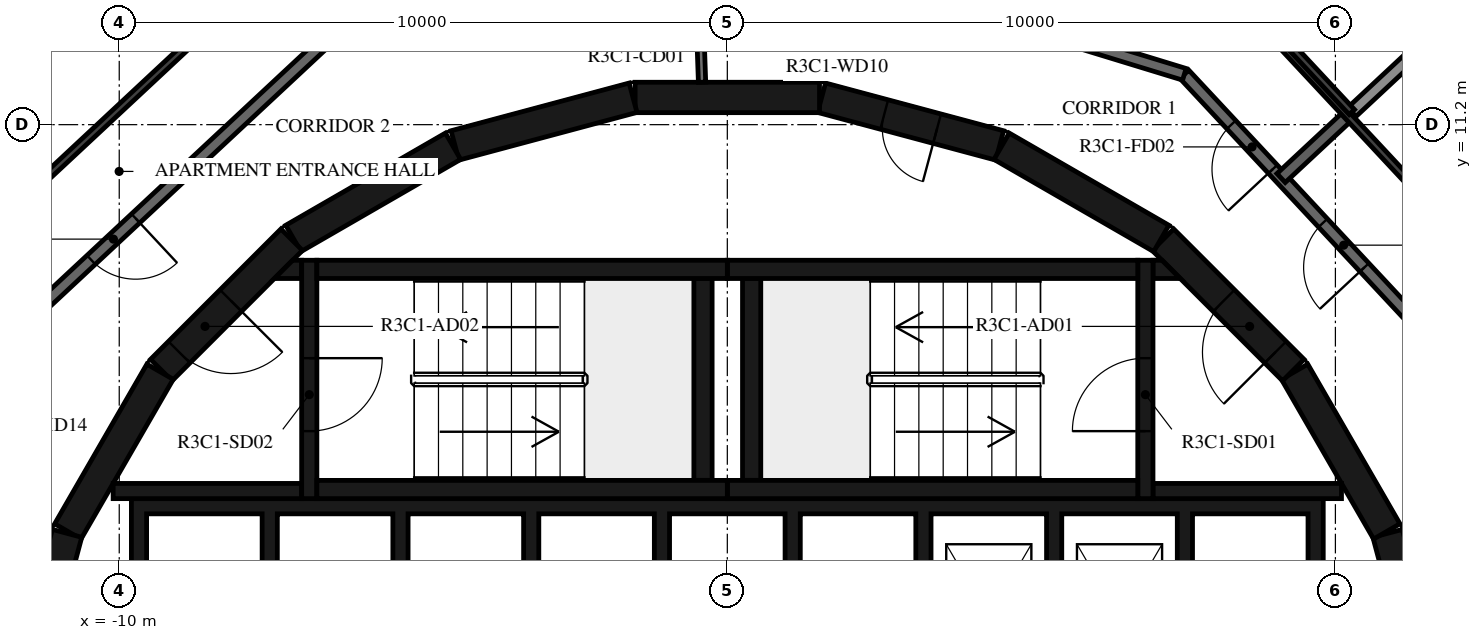
"""IFC4 building model, lengths in metres.
Left out: names, types, materials, properties, quantities, classifications, styles, units other than length and angle.
Written with IfcOpenShell. Run it as: python <this file> out.ifc"""

import sys

from ifc_helpers import new_model, si_unit, direction, frame, frame_2d, origin, place, context, subcontext, project, spatial, polyline, rectangle, outline, extrude, element, fill, save


model = new_model("IFC4")
c1 = context("Model", 3, precision=1e-05, world=origin(), true_north=direction((0.0, 1.0)))
c2 = subcontext(c1, "Body", "Model", "MODEL_VIEW")
j1 = project(units=[si_unit("LENGTHUNIT", "METRE"), si_unit("PLANEANGLEUNIT", "RADIAN")], contexts=[c1])
p1 = place(None, origin())
s1 = spatial("IfcSite", under=j1, at=p1, CompositionType="ELEMENT")
p2 = place(p1, origin())
s2 = spatial("IfcBuilding", under=s1, at=p2, CompositionType="ELEMENT")
p3 = place(p2, frame((0.0, 0.0, 137.9)))
s3 = spatial("IfcBuildingStorey", under=s2, at=p3, CompositionType="ELEMENT", Elevation=137.9)
for number, where, z_axis, x_axis in (
    (1, (11.643, 1.55, 0.0), (0.0, 0.0, 1.0), (-0.259, 0.966, 0.0)),
    (2, (10.845, 4.51, 0.0), (0.0, 0.0, 1.0), (-0.5, 0.866, 0.0)),
):
    element("IfcWall", number, at=place(p3, frame(where, z_axis=z_axis, x_axis=x_axis)), inside=s3, PredefinedType="SHEAR", context=c2, shape_type="SweptSolid", body=[
        extrude(rectangle(XDim=3.033, YDim=0.5, at=frame_2d((1.516, 0.0))), origin(), (0.0, 0.0, 1.0), 3.12),
    ])
p4 = place(p3, frame((9.308, 7.164, 0.0), z_axis=(0.0, 0.0, 1.0), x_axis=(-0.707106781187, 0.707106781187, 0.0)))
e3 = element("IfcWall", 3, at=p4, inside=s3, PredefinedType="SHEAR", context=c2, shape_type="SweptSolid", body=[
    extrude(rectangle(XDim=3.032, YDim=0.5, at=frame_2d((1.516, 0.0))), origin(), (0.0, 0.0, 1.0), 3.12),
])
p5 = place(p4, frame((0.416, 0.0, 0.0)))
e4 = element("IfcOpeningElement", 4, at=p5, cuts=e3, PredefinedType="OPENING", context=c2, shape_type="SweptSolid", body=[
    extrude(rectangle(XDim=1.2, YDim=2.1, at=frame_2d((0.6, 1.05))), frame((0.0, 0.26, 0.0), z_axis=(0.0, -1.0, 0.0), x_axis=(1.0, 0.0, 0.0)), (0.0, 0.0, 1.0), 0.52),
])
p6 = place(p3, frame((7.137, 9.329, 0.0), z_axis=(0.0, 0.0, 1.0), x_axis=(-0.865975092491, 0.500087131594, 0.0)))
e5 = element("IfcWall", 5, at=p6, inside=s3, PredefinedType="SHEAR", context=c2, shape_type="SweptSolid", body=[
    extrude(rectangle(XDim=3.033, YDim=0.5, at=frame_2d((1.516, 0.0))), origin(), (0.0, 0.0, 1.0), 3.12),
])
p7 = place(p3, frame((4.479, 10.858, 0.0), z_axis=(0.0, 0.0, 1.0), x_axis=(-0.965948410781, 0.258734743916, 0.0)))
e6 = element("IfcWall", 6, at=p7, inside=s3, PredefinedType="SHEAR", context=c2, shape_type="SweptSolid", body=[
    extrude(rectangle(XDim=3.033, YDim=0.5, at=frame_2d((1.516, 0.0))), origin(), (0.0, 0.0, 1.0), 3.12),
])
p8 = place(p7, frame((1.066, 0.0, 0.0)))
e7 = element("IfcOpeningElement", 7, at=p8, cuts=e6, PredefinedType="OPENING", context=c2, shape_type="SweptSolid", body=[
    extrude(rectangle(XDim=0.9, YDim=2.1, at=frame_2d((0.45, 1.05))), frame((0.0, 0.26, 0.0), z_axis=(0.0, -1.0, 0.0), x_axis=(1.0, 0.0, 0.0)), (0.0, 0.0, 1.0), 0.52),
])
for number, where, z_axis, x_axis in (
    (8, (1.516, 11.647, 0.0), (0.0, 0.0, 1.0), (-1.0, 0.0, 0.0)),
    (9, (-1.55, 11.643, 0.0), (0.0, 0.0, 1.0), (-0.966, -0.259, 0.0)),
    (10, (-4.51, 10.845, 0.0), (0.0, 0.0, 1.0), (-0.866, -0.5, 0.0)),
):
    element("IfcWall", number, at=place(p3, frame(where, z_axis=z_axis, x_axis=x_axis)), inside=s3, PredefinedType="SHEAR", context=c2, shape_type="SweptSolid", body=[
        extrude(rectangle(XDim=3.033, YDim=0.5, at=frame_2d((1.516, 0.0))), origin(), (0.0, 0.0, 1.0), 3.12),
    ])
p9 = place(p3, frame((-7.164, 9.308, 0.0), z_axis=(0.0, 0.0, 1.0), x_axis=(-0.707106781187, -0.707106781187, 0.0)))
e11 = element("IfcWall", 11, at=p9, inside=s3, PredefinedType="SHEAR", context=c2, shape_type="SweptSolid", body=[
    extrude(rectangle(XDim=3.032, YDim=0.5, at=frame_2d((1.516, 0.0))), origin(), (0.0, 0.0, 1.0), 3.12),
])
p10 = place(p9, frame((1.416, 0.0, 0.0)))
e12 = element("IfcOpeningElement", 12, at=p10, cuts=e11, PredefinedType="OPENING", context=c2, shape_type="SweptSolid", body=[
    extrude(rectangle(XDim=1.2, YDim=2.1, at=frame_2d((0.6, 1.05))), frame((0.0, 0.26, 0.0), z_axis=(0.0, -1.0, 0.0), x_axis=(1.0, 0.0, 0.0)), (0.0, 0.0, 1.0), 0.52),
])
for number, where, z_axis, x_axis in (
    (13, (-9.329, 7.137, 0.0), (0.0, 0.0, 1.0), (-0.5, -0.866, 0.0)),
    (14, (-10.858, 4.479, 0.0), (0.0, 0.0, 1.0), (-0.259, -0.966, 0.0)),
):
    element("IfcWall", number, at=place(p3, frame(where, z_axis=z_axis, x_axis=x_axis)), inside=s3, PredefinedType="SHEAR", context=c2, shape_type="SweptSolid", body=[
        extrude(rectangle(XDim=3.033, YDim=0.5, at=frame_2d((1.516, 0.0))), origin(), (0.0, 0.0, 1.0), 3.12),
    ])
for number, where, z_axis, x_axis in (
    (15, (0.0, 5.2, 0.0), (0.0, 0.0, 1.0), (1.0, 0.0, 0.0)),
    (16, (0.0, 8.82, 0.0), (0.0, 0.0, 1.0), (1.0, 0.0, 0.0)),
):
    element("IfcWall", number, at=place(p3, frame(where, z_axis=z_axis, x_axis=x_axis)), inside=s3, PredefinedType="SHEAR", context=c2, shape_type="SweptSolid", body=[
        extrude(rectangle(XDim=6.75, YDim=0.3, at=frame_2d((3.375, 0.0))), origin(), (0.0, 0.0, 1.0), 3.12),
    ])
p11 = place(p3, frame((0.4, 5.35, 0.0), z_axis=(0.0, 0.0, 1.0), x_axis=(0.0, 1.0, 0.0)))
e17 = element("IfcWall", 17, at=p11, inside=s3, PredefinedType="SHEAR", context=c2, shape_type="SweptSolid", body=[
    extrude(rectangle(XDim=3.32, YDim=0.3, at=frame_2d((1.66, 0.0))), origin(), (0.0, 0.0, 1.0), 3.12),
])
p12 = place(p3, frame((6.875, 5.05, 0.0), z_axis=(0.0, 0.0, 1.0), x_axis=(0.0, 1.0, 0.0)))
e18 = element("IfcWall", 18, at=p12, inside=s3, PredefinedType="SHEAR", context=c2, shape_type="SweptSolid", body=[
    extrude(rectangle(XDim=3.92, YDim=0.25, at=frame_2d((1.96, 0.0))), origin(), (0.0, 0.0, 1.0), 3.12),
])
p13 = place(p12, frame((1.11, 0.0, 0.0)))
e19 = element("IfcOpeningElement", 19, at=p13, cuts=e18, PredefinedType="OPENING", context=c2, shape_type="SweptSolid", body=[
    extrude(rectangle(XDim=1.2, YDim=2.1, at=frame_2d((0.6, 1.05))), frame((0.0, 0.135, 0.0), z_axis=(0.0, -1.0, 0.0), x_axis=(1.0, 0.0, 0.0)), (0.0, 0.0, 1.0), 0.27),
])
p14 = place(p3, frame((7.0, 5.175, 0.0), z_axis=(0.0, 0.0, 1.0), x_axis=(1.0, 0.0, 0.0)))
e20 = element("IfcWall", 20, at=p14, inside=s3, PredefinedType="SHEAR", context=c2, shape_type="SweptSolid", body=[
    extrude(rectangle(XDim=3.1, YDim=0.25, at=frame_2d((1.55, 0.0))), origin(), (0.0, 0.0, 1.0), 3.12),
])
p15 = place(p3, origin())
e21 = element("IfcWall", 21, at=p15, inside=s3, PredefinedType="SHEAR", context=c2, shape_type="SweptSolid", body=[
    extrude(outline(polyline([(7.448, 8.67), (7.0, 8.67), (7.0, 8.97), (7.148, 8.97), (7.448, 8.67)])), origin(), (0.0, 0.0, 1.0), 3.12),
])
for number, where, z_axis, x_axis in (
    (22, (-6.75, 5.2, 0.0), (0.0, 0.0, 1.0), (1.0, 0.0, 0.0)),
    (23, (-6.75, 8.82, 0.0), (0.0, 0.0, 1.0), (1.0, 0.0, 0.0)),
):
    element("IfcWall", number, at=place(p3, frame(where, z_axis=z_axis, x_axis=x_axis)), inside=s3, PredefinedType="SHEAR", context=c2, shape_type="SweptSolid", body=[
        extrude(rectangle(XDim=6.75, YDim=0.3, at=frame_2d((3.375, 0.0))), origin(), (0.0, 0.0, 1.0), 3.12),
    ])
p16 = place(p3, frame((-0.4, 5.35, 0.0), z_axis=(0.0, 0.0, 1.0), x_axis=(0.0, 1.0, 0.0)))
e24 = element("IfcWall", 24, at=p16, inside=s3, PredefinedType="SHEAR", context=c2, shape_type="SweptSolid", body=[
    extrude(rectangle(XDim=3.32, YDim=0.3, at=frame_2d((1.66, 0.0))), origin(), (0.0, 0.0, 1.0), 3.12),
])
p17 = place(p3, frame((-6.875, 8.97, 0.0), z_axis=(0.0, 0.0, 1.0), x_axis=(0.0, -1.0, 0.0)))
e25 = element("IfcWall", 25, at=p17, inside=s3, PredefinedType="SHEAR", context=c2, shape_type="SweptSolid", body=[
    extrude(rectangle(XDim=3.92, YDim=0.25, at=frame_2d((1.96, 0.0))), origin(), (0.0, 0.0, 1.0), 3.12),
])
p18 = place(p17, frame((1.61, 0.0, 0.0)))
e26 = element("IfcOpeningElement", 26, at=p18, cuts=e25, PredefinedType="OPENING", context=c2, shape_type="SweptSolid", body=[
    extrude(rectangle(XDim=1.2, YDim=2.1, at=frame_2d((0.6, 1.05))), frame((0.0, 0.135, 0.0), z_axis=(0.0, -1.0, 0.0), x_axis=(1.0, 0.0, 0.0)), (0.0, 0.0, 1.0), 0.27),
])
p19 = place(p3, frame((-7.0, 5.175, 0.0), z_axis=(0.0, 0.0, 1.0), x_axis=(-1.0, 0.0, 0.0)))
e27 = element("IfcWall", 27, at=p19, inside=s3, PredefinedType="SHEAR", context=c2, shape_type="SweptSolid", body=[
    extrude(rectangle(XDim=3.1, YDim=0.25, at=frame_2d((1.55, 0.0))), origin(), (0.0, 0.0, 1.0), 3.12),
])
p20 = place(p3, origin())
e28 = element("IfcWall", 28, at=p20, inside=s3, PredefinedType="SHEAR", context=c2, shape_type="SweptSolid", body=[
    extrude(outline(polyline([(-7.148, 8.97), (-7.0, 8.97), (-7.0, 8.67), (-7.448, 8.67), (-7.148, 8.97)])), origin(), (0.0, 0.0, 1.0), 3.12),
])
p21 = place(p3, origin())
e29 = element("IfcWall", 29, at=p21, inside=s3, PredefinedType="SHEAR", context=c2, shape_type="SweptSolid", body=[
    extrude(outline(polyline([(-9.55, 4.8), (-7.65, 4.8), (-7.65, 1.9), (-7.4, 1.9), (-7.4, 4.8), (-5.5, 4.8), (-5.5, 1.9), (-5.25, 1.9), (-5.25, 4.8), (-3.35, 4.8), (-3.35, 1.9), (-3.1, 1.9), (-3.1, 4.8), (-1.2, 4.8), (-1.2, 1.9), (-0.95, 1.9), (-0.95, 4.8), (0.95, 4.8), (0.95, 1.9), (1.2, 1.9), (1.2, 4.8), (3.1, 4.8), (3.1, 1.9), (3.35, 1.9), (3.35, 4.8), (5.25, 4.8), (5.25, 1.9), (5.5, 1.9), (5.5, 4.8), (7.4, 4.8), (7.4, 1.9), (7.65, 1.9), (7.65, 4.8), (9.55, 4.8), (9.55, 1.9), (9.8, 1.9), (9.8, 4.8), (9.8, 5.05), (-9.8, 5.05), (-9.8, 4.8), (-9.8, 1.9), (-9.55, 1.9), (-9.55, 4.8)])), origin(), (0.0, 0.0, 1.0), 3.12),
])
p22 = place(p3, frame((-0.487, 13.948, 0.0), z_axis=(0.0, 0.0, 1.0), x_axis=(0.034859752231, -0.999392214135, 0.0)))
e30 = element("IfcWall", 30, at=p22, inside=s3, PredefinedType="PARTITIONING", context=c2, shape_type="SweptSolid", body=[
    extrude(rectangle(XDim=2.052, YDim=0.12, at=frame_2d((1.026, 0.0))), origin(), (0.0, 0.0, 1.0), 3.12),
])
p23 = place(p22, frame((0.125, 0.0, 0.0)))
e31 = element("IfcOpeningElement", 31, at=p23, cuts=e30, PredefinedType="OPENING", context=c2, shape_type="SweptSolid", body=[
    extrude(rectangle(XDim=1.2, YDim=2.1, at=frame_2d((0.6, 1.05))), frame((0.0, 0.07, 0.0), z_axis=(0.0, -1.0, 0.0), x_axis=(1.0, 0.0, 0.0)), (0.0, 0.0, 1.0), 0.14),
])
p24 = place(p3, frame((12.523, 6.659, 0.0), z_axis=(0.0, 0.0, 1.0), x_axis=(-0.682001841105, 0.731350455479, 0.0)))
e32 = element("IfcWall", 32, at=p24, inside=s3, PredefinedType="STANDARD", context=c2, shape_type="SweptSolid", body=[
    extrude(rectangle(XDim=7.342, YDim=0.2, at=frame_2d((3.671, 0.0))), origin(), (0.0, 0.0, 1.0), 3.12),
])
p25 = place(p24, frame((3.0, 0.0, 0.0)))
e33 = element("IfcOpeningElement", 33, at=p25, cuts=e32, PredefinedType="OPENING", context=c2, shape_type="SweptSolid", body=[
    extrude(rectangle(XDim=1.0, YDim=2.1, at=frame_2d((0.5, 1.05))), frame((0.0, 0.11, 0.0), z_axis=(0.0, -1.0, 0.0), x_axis=(1.0, 0.0, 0.0)), (0.0, 0.0, 1.0), 0.22),
])
p26 = place(p24, frame((5.209, 0.0, 0.0)))
e34 = element("IfcOpeningElement", 34, at=p26, cuts=e32, PredefinedType="OPENING", context=c2, shape_type="SweptSolid", body=[
    extrude(rectangle(XDim=1.0, YDim=2.1, at=frame_2d((0.5, 1.05))), frame((0.0, 0.11, 0.0), z_axis=(0.0, -1.0, 0.0), x_axis=(1.0, 0.0, 0.0)), (0.0, 0.0, 1.0), 0.22),
])
p27 = place(p3, frame((7.516, 12.028, 0.0), z_axis=(0.0, 0.0, 1.0), x_axis=(-0.956306642771, 0.292365533182, 0.0)))
e35 = element("IfcWall", 35, at=p27, inside=s3, PredefinedType="STANDARD", context=c2, shape_type="SweptSolid", body=[
    extrude(rectangle(XDim=7.342, YDim=0.2, at=frame_2d((3.671, 0.0))), origin(), (0.0, 0.0, 1.0), 3.12),
])
p28 = place(p3, frame((-6.659, 12.523, 0.0), z_axis=(0.0, 0.0, 1.0), x_axis=(-0.731350455479, -0.682001841105, 0.0)))
e36 = element("IfcWall", 36, at=p28, inside=s3, PredefinedType="STANDARD", context=c2, shape_type="SweptSolid", body=[
    extrude(rectangle(XDim=7.342, YDim=0.2, at=frame_2d((3.671, 0.0))), origin(), (0.0, 0.0, 1.0), 3.12),
])
p29 = place(p28, frame((4.2, 0.0, 0.0)))
e37 = element("IfcOpeningElement", 37, at=p29, cuts=e36, PredefinedType="OPENING", context=c2, shape_type="SweptSolid", body=[
    extrude(rectangle(XDim=1.0, YDim=2.1, at=frame_2d((0.5, 1.05))), frame((0.0, 0.11, 0.0), z_axis=(0.0, -1.0, 0.0), x_axis=(1.0, 0.0, 0.0)), (0.0, 0.0, 1.0), 0.22),
])
p30 = place(p3, frame((10.233, 11.372, 0.0), z_axis=(0.0, 0.0, 1.0), x_axis=(-0.731329353292, -0.682024469513, 0.0)))
e38 = element("IfcWall", 38, at=p30, inside=s3, PredefinedType="STANDARD", context=c2, shape_type="SweptSolid", body=[
    extrude(rectangle(XDim=1.54, YDim=0.2, at=frame_2d((0.77, 0.0))), origin(), (0.0, 0.0, 1.0), 3.12),
])
p31 = place(p3, frame((12.903, 13.862, 0.0), z_axis=(0.0, 0.0, 1.0), x_axis=(-0.731328084739, -0.682025829769, 0.0)))
e39 = element("IfcWall", 39, at=p31, inside=s3, PredefinedType="STANDARD", context=c2, shape_type="SweptSolid", body=[
    extrude(rectangle(XDim=3.6, YDim=0.2, at=frame_2d((1.8, 0.0))), origin(), (0.0, 0.0, 1.0), 2.73),
])
p32 = place(p3, frame((13.894, 7.388, 0.0), z_axis=(0.0, 0.0, 1.0), x_axis=(-0.681994622729, 0.731357186721, 0.0)))
e40 = element("IfcWall", 40, at=p32, inside=s3, PredefinedType="PARTITIONING", context=c2, shape_type="SweptSolid", body=[
    extrude(rectangle(XDim=8.146, YDim=0.12, at=frame_2d((4.073, 0.0))), origin(), (0.0, 0.0, 1.0), 3.12),
])
p33 = place(p32, frame((0.2, 0.0, 0.0)))
e41 = element("IfcOpeningElement", 41, at=p33, cuts=e40, PredefinedType="OPENING", context=c2, shape_type="SweptSolid", body=[
    extrude(rectangle(XDim=0.9, YDim=2.1, at=frame_2d((0.45, 1.05))), frame((0.0, 0.07, 0.0), z_axis=(0.0, -1.0, 0.0), x_axis=(1.0, 0.0, 0.0)), (0.0, 0.0, 1.0), 0.14),
])
p34 = place(p3, frame((-1.539, 24.071, 0.0), z_axis=(0.0, 0.0, 1.0), x_axis=(0.68200220595, -0.731350115252, 0.0)))
e42 = element("IfcWall", 42, at=p34, inside=s3, PredefinedType="PARTITIONING", context=c2, shape_type="SweptSolid", body=[
    extrude(rectangle(XDim=17.316, YDim=0.12, at=frame_2d((8.658, 0.0))), origin(), (0.0, 0.0, 1.0), 3.12),
])
p35 = place(p34, frame((3.323, 0.0, 0.0)))
e43 = element("IfcOpeningElement", 43, at=p35, cuts=e42, PredefinedType="OPENING", context=c2, shape_type="SweptSolid", body=[
    extrude(rectangle(XDim=0.9, YDim=2.1, at=frame_2d((0.45, 1.05))), frame((0.0, 0.07, 0.0), z_axis=(0.0, -1.0, 0.0), x_axis=(1.0, 0.0, 0.0)), (0.0, 0.0, 1.0), 0.14),
])
p36 = place(p34, frame((0.2, 0.0, 0.0)))
e44 = element("IfcOpeningElement", 44, at=p36, cuts=e42, PredefinedType="OPENING", context=c2, shape_type="SweptSolid", body=[
    extrude(rectangle(XDim=0.9, YDim=2.1, at=frame_2d((0.45, 1.05))), frame((0.0, 0.07, 0.0), z_axis=(0.0, -1.0, 0.0), x_axis=(1.0, 0.0, 0.0)), (0.0, 0.0, 1.0), 0.14),
])
p37 = place(p3, frame((-7.388, 13.894, 0.0), z_axis=(0.0, 0.0, 1.0), x_axis=(-0.731357186721, -0.681994622729, 0.0)))
e45 = element("IfcWall", 45, at=p37, inside=s3, PredefinedType="PARTITIONING", context=c2, shape_type="SweptSolid", body=[
    extrude(rectangle(XDim=8.146, YDim=0.12, at=frame_2d((4.073, 0.0))), origin(), (0.0, 0.0, 1.0), 3.12),
])
p38 = place(p37, frame((0.725, 0.0, 0.0)))
e46 = element("IfcOpeningElement", 46, at=p38, cuts=e45, PredefinedType="OPENING", context=c2, shape_type="SweptSolid", body=[
    extrude(rectangle(XDim=0.8, YDim=2.1, at=frame_2d((0.4, 1.05))), frame((0.0, 0.07, 0.0), z_axis=(0.0, -1.0, 0.0), x_axis=(1.0, 0.0, 0.0)), (0.0, 0.0, 1.0), 0.14),
])
p39 = place(p37, frame((6.927, 0.0, 0.0)))
e47 = element("IfcOpeningElement", 47, at=p39, cuts=e45, PredefinedType="OPENING", context=c2, shape_type="SweptSolid", body=[
    extrude(rectangle(XDim=0.9, YDim=2.1, at=frame_2d((0.45, 1.05))), frame((0.0, 0.07, 0.0), z_axis=(0.0, -1.0, 0.0), x_axis=(1.0, 0.0, 0.0)), (0.0, 0.0, 1.0), 0.14),
])
p40 = place(p3, frame((-8.417, 22.031, 0.0), z_axis=(0.0, 0.0, 1.0), x_axis=(-0.292371891841, -0.956304698755, 0.0)))
e48 = element("IfcWall", 48, at=p40, inside=s3, PredefinedType="PARTITIONING", context=c2, shape_type="SweptSolid", body=[
    extrude(rectangle(XDim=13.306, YDim=0.12, at=frame_2d((6.653, 0.0))), origin(), (0.0, 0.0, 1.0), 3.12),
])
p41 = place(p40, frame((2.777, 0.0, 0.0)))
e49 = element("IfcOpeningElement", 49, at=p41, cuts=e48, PredefinedType="OPENING", context=c2, shape_type="SweptSolid", body=[
    extrude(rectangle(XDim=0.9, YDim=2.1, at=frame_2d((0.45, 1.05))), frame((0.0, 0.07, 0.0), z_axis=(0.0, -1.0, 0.0), x_axis=(1.0, 0.0, 0.0)), (0.0, 0.0, 1.0), 0.14),
])
p42 = place(p13, origin())
e50 = element("IfcDoor", 50, at=p42, inside=s3, OperationType="SINGLE_SWING_LEFT", PredefinedType="DOOR", context=c2, shape_type="SweptSolid", body=[
    extrude(rectangle(XDim=1.2, YDim=2.1, at=frame_2d((0.6, 1.05))), frame((0.0, 0.025, 0.0), z_axis=(0.0, -1.0, 0.0), x_axis=(1.0, 0.0, 0.0)), (0.0, 0.0, 1.0), 0.05),
])
fill(e19, e50)
p43 = place(p5, origin())
e51 = element("IfcDoor", 51, at=p43, inside=s3, OperationType="SINGLE_SWING_RIGHT", PredefinedType="DOOR", context=c2, shape_type="SweptSolid", body=[
    extrude(rectangle(XDim=1.2, YDim=2.1, at=frame_2d((0.6, 1.05))), frame((0.0, 0.025, 0.0), z_axis=(0.0, -1.0, 0.0), x_axis=(1.0, 0.0, 0.0)), (0.0, 0.0, 1.0), 0.05),
])
fill(e4, e51)
p44 = place(p18, origin())
e52 = element("IfcDoor", 52, at=p44, inside=s3, OperationType="SINGLE_SWING_LEFT", PredefinedType="DOOR", context=c2, shape_type="SweptSolid", body=[
    extrude(rectangle(XDim=1.2, YDim=2.1, at=frame_2d((0.6, 1.05))), frame((0.0, 0.025, 0.0), z_axis=(0.0, -1.0, 0.0), x_axis=(1.0, 0.0, 0.0)), (0.0, 0.0, 1.0), 0.05),
])
fill(e26, e52)
p45 = place(p10, origin())
e53 = element("IfcDoor", 53, at=p45, inside=s3, OperationType="SINGLE_SWING_RIGHT", PredefinedType="DOOR", context=c2, shape_type="SweptSolid", body=[
    extrude(rectangle(XDim=1.2, YDim=2.1, at=frame_2d((0.6, 1.05))), frame((0.0, 0.025, 0.0), z_axis=(0.0, -1.0, 0.0), x_axis=(1.0, 0.0, 0.0)), (0.0, 0.0, 1.0), 0.05),
])
fill(e12, e53)
p46 = place(p8, origin())
e54 = element("IfcDoor", 54, at=p46, inside=s3, OperationType="SINGLE_SWING_LEFT", PredefinedType="DOOR", context=c2, shape_type="SweptSolid", body=[
    extrude(rectangle(XDim=0.9, YDim=2.1, at=frame_2d((0.45, 1.05))), frame((0.0, 0.025, 0.0), z_axis=(0.0, -1.0, 0.0), x_axis=(1.0, 0.0, 0.0)), (0.0, 0.0, 1.0), 0.05),
])
fill(e7, e54)
p47 = place(p25, origin())
e55 = element("IfcDoor", 55, at=p47, inside=s3, OperationType="SINGLE_SWING_LEFT", PredefinedType="DOOR", context=c2, shape_type="SweptSolid", body=[
    extrude(rectangle(XDim=1.0, YDim=2.1, at=frame_2d((0.5, 1.05))), frame((0.0, 0.025, 0.0), z_axis=(0.0, -1.0, 0.0), x_axis=(1.0, 0.0, 0.0)), (0.0, 0.0, 1.0), 0.05),
])
fill(e33, e55)
p48 = place(p26, origin())
e56 = element("IfcDoor", 56, at=p48, inside=s3, OperationType="SINGLE_SWING_RIGHT", PredefinedType="DOOR", context=c2, shape_type="SweptSolid", body=[
    extrude(rectangle(XDim=1.0, YDim=2.1, at=frame_2d((0.5, 1.05))), frame((0.0, 0.025, 0.0), z_axis=(0.0, -1.0, 0.0), x_axis=(1.0, 0.0, 0.0)), (0.0, 0.0, 1.0), 0.05),
])
fill(e34, e56)
p49 = place(p29, origin())
e57 = element("IfcDoor", 57, at=p49, inside=s3, OperationType="SINGLE_SWING_LEFT", PredefinedType="DOOR", context=c2, shape_type="SweptSolid", body=[
    extrude(rectangle(XDim=1.0, YDim=2.1, at=frame_2d((0.5, 1.05))), frame((0.0, 0.025, 0.0), z_axis=(0.0, -1.0, 0.0), x_axis=(1.0, 0.0, 0.0)), (0.0, 0.0, 1.0), 0.05),
])
fill(e37, e57)
save(model, sys.argv[1])
